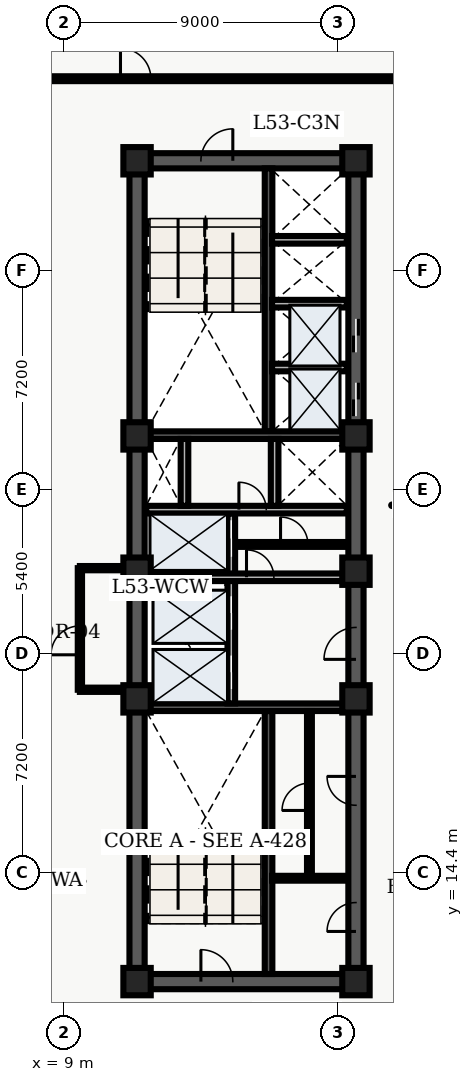
"""IFC4 building model, lengths in metres.
Left out: names, types, materials, properties, quantities, classifications, styles, units other than length and angle.
Written with IfcOpenShell. Run it as: python <this file> out.ifc"""

import sys

from ifc_helpers import new_model, entity, si_unit, converted_unit, direction, frame, origin_with_axes, origin_2d_with_axis, place, context, subcontext, project, spatial, polyline, rectangle, outline, extrude, element, fill, save


model = new_model("IFC4")
c1 = context("Model", 3, precision=1e-05, world=origin_with_axes(), true_north=direction((0.0, 1.0)))
c2 = subcontext(c1, "Body", "Model", "MODEL_VIEW")
j1 = project(units=[si_unit("LENGTHUNIT", "METRE"), converted_unit("PLANEANGLEUNIT", "DEGREE", entity("IfcPlaneAngleMeasure", 0.017), si_unit("PLANEANGLEUNIT", "RADIAN"), dimensions=[0, 0, 0, 0, 0, 0, 0])], contexts=[c1])
p1 = place(None, origin_with_axes())
s1 = spatial("IfcSite", under=j1, at=p1, CompositionType="ELEMENT")
p2 = place(p1, origin_with_axes())
s2 = spatial("IfcBuilding", under=s1, at=p2, CompositionType="ELEMENT")
p3 = place(p2, frame((0.0, 0.0, 216.0), z_axis=(0.0, 0.0, 1.0), x_axis=(1.0, 0.0, 0.0)))
s3 = spatial("IfcBuildingStorey", under=s2, at=p3, CompositionType="ELEMENT", Elevation=216.0)
p4 = place(p3, frame((11.4, 10.8, 0.0), z_axis=(0.0, 0.0, 1.0), x_axis=(0.0, 1.0, 0.0)))
e1 = element("IfcWall", 1, at=p4, inside=s3, PredefinedType="SHEAR", context=c2, shape_type="SweptSolid", body=[
    extrude(outline(polyline([(0.0, -0.25), (27.0, -0.25), (27.0, 0.25), (0.0, 0.25), (0.0, -0.25)])), origin_with_axes(), (0.0, 0.0, 1.0), 3.6),
])
p5 = place(p3, frame((11.4, 10.8, 0.0), z_axis=(0.0, 0.0, 1.0), x_axis=(1.0, 0.0, 0.0)))
e2 = element("IfcWall", 2, at=p5, inside=s3, PredefinedType="SHEAR", context=c2, shape_type="SweptSolid", body=[
    extrude(outline(polyline([(0.0, -0.25), (7.2, -0.25), (7.2, 0.25), (0.0, 0.25), (0.0, -0.25)])), origin_with_axes(), (0.0, 0.0, 1.0), 3.6),
])
p6 = place(p5, frame((2.625, 0.0, 0.0), z_axis=(0.0, 0.0, 1.0), x_axis=(1.0, 0.0, 0.0)))
e3 = element("IfcOpeningElement", 3, at=p6, cuts=e2, PredefinedType="OPENING", context=c2, shape_type="SweptSolid", body=[
    extrude(rectangle(XDim=1.05, YDim=0.52, at=origin_2d_with_axis()), origin_with_axes(), (0.0, 0.0, 1.0), 2.15),
])
p7 = place(p3, frame((11.4, 37.8, 0.0), z_axis=(0.0, 0.0, 1.0), x_axis=(1.0, 0.0, 0.0)))
e4 = element("IfcWall", 4, at=p7, inside=s3, PredefinedType="SHEAR", context=c2, shape_type="SweptSolid", body=[
    extrude(outline(polyline([(0.0, -0.25), (7.2, -0.25), (7.2, 0.25), (0.0, 0.25), (0.0, -0.25)])), origin_with_axes(), (0.0, 0.0, 1.0), 3.6),
])
p8 = place(p7, frame((2.625, 0.0, 0.0), z_axis=(0.0, 0.0, 1.0), x_axis=(1.0, 0.0, 0.0)))
e5 = element("IfcOpeningElement", 5, at=p8, cuts=e4, PredefinedType="OPENING", context=c2, shape_type="SweptSolid", body=[
    extrude(rectangle(XDim=1.05, YDim=0.52, at=origin_2d_with_axis()), origin_with_axes(), (0.0, 0.0, 1.0), 2.15),
])
p9 = place(p3, frame((18.6, 10.8, 0.0), z_axis=(0.0, 0.0, 1.0), x_axis=(0.0, 1.0, 0.0)))
e6 = element("IfcWall", 6, at=p9, inside=s3, PredefinedType="SHEAR", context=c2, shape_type="SweptSolid", body=[
    extrude(outline(polyline([(0.0, -0.25), (13.5, -0.25), (13.5, 0.25), (0.0, 0.25), (0.0, -0.25)])), origin_with_axes(), (0.0, 0.0, 1.0), 3.6),
])
p10 = place(p9, frame((11.125, 0.0, 0.0), z_axis=(0.0, 0.0, 1.0), x_axis=(1.0, 0.0, 0.0)))
e7 = element("IfcOpeningElement", 7, at=p10, cuts=e6, PredefinedType="OPENING", context=c2, shape_type="SweptSolid", body=[
    extrude(rectangle(XDim=1.05, YDim=0.52, at=origin_2d_with_axis()), origin_with_axes(), (0.0, 0.0, 1.0), 2.15),
])
p11 = place(p9, frame((2.125, 0.0, 0.0), z_axis=(0.0, 0.0, 1.0), x_axis=(1.0, 0.0, 0.0)))
e8 = element("IfcOpeningElement", 8, at=p11, cuts=e6, PredefinedType="OPENING", context=c2, shape_type="SweptSolid", body=[
    extrude(rectangle(XDim=0.95, YDim=0.52, at=origin_2d_with_axis()), origin_with_axes(), (0.0, 0.0, 1.0), 2.15),
])
p12 = place(p9, frame((6.275, 0.0, 0.0), z_axis=(0.0, 0.0, 1.0), x_axis=(1.0, 0.0, 0.0)))
e9 = element("IfcOpeningElement", 9, at=p12, cuts=e6, PredefinedType="OPENING", context=c2, shape_type="SweptSolid", body=[
    extrude(rectangle(XDim=0.95, YDim=0.52, at=origin_2d_with_axis()), origin_with_axes(), (0.0, 0.0, 1.0), 2.15),
])
p13 = place(p3, frame((18.6, 24.3, 0.0), z_axis=(0.0, 0.0, 1.0), x_axis=(0.0, 1.0, 0.0)))
e10 = element("IfcWall", 10, at=p13, inside=s3, PredefinedType="SHEAR", context=c2, shape_type="SweptSolid", body=[
    extrude(outline(polyline([(0.0, -0.25), (13.5, -0.25), (13.5, 0.25), (0.0, 0.25), (0.0, -0.25)])), origin_with_axes(), (0.0, 0.0, 1.0), 3.6),
])
p14 = place(p13, frame((5.65, 0.0, 0.0), z_axis=(0.0, 0.0, 1.0), x_axis=(1.0, 0.0, 0.0)))
e11 = element("IfcOpeningElement", 11, at=p14, cuts=e10, PredefinedType="OPENING", context=c2, shape_type="SweptSolid", body=[
    extrude(rectangle(XDim=1.1, YDim=0.52, at=origin_2d_with_axis()), origin_with_axes(), (0.0, 0.0, 1.0), 2.15),
])
p15 = place(p13, frame((7.75, 0.0, 0.0), z_axis=(0.0, 0.0, 1.0), x_axis=(1.0, 0.0, 0.0)))
e12 = element("IfcOpeningElement", 12, at=p15, cuts=e10, PredefinedType="OPENING", context=c2, shape_type="SweptSolid", body=[
    extrude(rectangle(XDim=1.1, YDim=0.52, at=origin_2d_with_axis()), origin_with_axes(), (0.0, 0.0, 1.0), 2.15),
])
p16 = place(p3, frame((15.725, 11.05, 0.0), z_axis=(0.0, 0.0, 1.0), x_axis=(0.0, 1.0, 0.0)))
e13 = element("IfcWall", 13, at=p16, inside=s3, PredefinedType="SHEAR", context=c2, shape_type="SweptSolid", body=[
    extrude(outline(polyline([(0.0, -0.125), (8.65, -0.125), (8.65, 0.125), (0.0, 0.125), (0.0, -0.125)])), origin_with_axes(), (0.0, 0.0, 1.0), 3.6),
])
p17 = place(p3, frame((11.65, 19.825, 0.0), z_axis=(0.0, 0.0, 1.0), x_axis=(1.0, 0.0, 0.0)))
e14 = element("IfcWall", 14, at=p17, inside=s3, PredefinedType="SHEAR", context=c2, shape_type="SweptSolid", body=[
    extrude(outline(polyline([(0.0, -0.125), (6.7, -0.125), (6.7, 0.125), (0.0, 0.125), (0.0, -0.125)])), origin_with_axes(), (0.0, 0.0, 1.0), 3.6),
])
p18 = place(p3, frame((15.725, 28.9, 0.0), z_axis=(0.0, 0.0, 1.0), x_axis=(0.0, 1.0, 0.0)))
e15 = element("IfcWall", 15, at=p18, inside=s3, PredefinedType="SHEAR", context=c2, shape_type="SweptSolid", body=[
    extrude(outline(polyline([(0.0, -0.125), (8.65, -0.125), (8.65, 0.125), (0.0, 0.125), (0.0, -0.125)])), origin_with_axes(), (0.0, 0.0, 1.0), 3.6),
])
p19 = place(p3, frame((11.65, 28.775, 0.0), z_axis=(0.0, 0.0, 1.0), x_axis=(1.0, 0.0, 0.0)))
e16 = element("IfcWall", 16, at=p19, inside=s3, PredefinedType="SHEAR", context=c2, shape_type="SweptSolid", body=[
    extrude(outline(polyline([(0.0, -0.125), (6.7, -0.125), (6.7, 0.125), (0.0, 0.125), (0.0, -0.125)])), origin_with_axes(), (0.0, 0.0, 1.0), 3.6),
])
p20 = place(p3, frame((14.5, 19.95, 0.0), z_axis=(0.0, 0.0, 1.0), x_axis=(0.0, 1.0, 0.0)))
e17 = element("IfcWall", 17, at=p20, inside=s3, PredefinedType="SOLIDWALL", context=c2, shape_type="SweptSolid", body=[
    extrude(outline(polyline([(0.0, -0.125), (6.25, -0.125), (6.25, 0.125), (0.0, 0.125), (0.0, -0.125)])), origin_with_axes(), (0.0, 0.0, 1.0), 2.64),
])
p21 = place(p20, frame((1.025, 0.0, 0.0), z_axis=(0.0, 0.0, 1.0), x_axis=(1.0, 0.0, 0.0)))
e18 = element("IfcOpeningElement", 18, at=p21, cuts=e17, PredefinedType="OPENING", context=c2, shape_type="SweptSolid", body=[
    extrude(rectangle(XDim=1.1, YDim=0.27, at=origin_2d_with_axis()), origin_with_axes(), (0.0, 0.0, 1.0), 2.15),
])
p22 = place(p20, frame((2.975, 0.0, 0.0), z_axis=(0.0, 0.0, 1.0), x_axis=(1.0, 0.0, 0.0)))
e19 = element("IfcOpeningElement", 19, at=p22, cuts=e17, PredefinedType="OPENING", context=c2, shape_type="SweptSolid", body=[
    extrude(rectangle(XDim=1.1, YDim=0.27, at=origin_2d_with_axis()), origin_with_axes(), (0.0, 0.0, 1.0), 2.15),
])
p23 = place(p20, frame((5.425, 0.0, 0.0), z_axis=(0.0, 0.0, 1.0), x_axis=(1.0, 0.0, 0.0)))
e20 = element("IfcOpeningElement", 20, at=p23, cuts=e17, PredefinedType="OPENING", context=c2, shape_type="SweptSolid", body=[
    extrude(rectangle(XDim=1.2, YDim=0.27, at=origin_2d_with_axis()), origin_with_axes(), (0.0, 0.0, 1.0), 2.15),
])
p24 = place(p3, frame((11.7, 24.1, 0.0), z_axis=(0.0, 0.0, 1.0), x_axis=(1.0, 0.0, 0.0)))
e21 = element("IfcWall", 21, at=p24, inside=s3, PredefinedType="SOLIDWALL", context=c2, shape_type="SweptSolid", body=[
    extrude(outline(polyline([(0.0, -0.125), (6.6, -0.125), (6.6, 0.125), (0.0, 0.125), (0.0, -0.125)])), origin_with_axes(), (0.0, 0.0, 1.0), 2.64),
])
p25 = place(p24, frame((3.75, 0.0, 0.0), z_axis=(0.0, 0.0, 1.0), x_axis=(1.0, 0.0, 0.0)))
e22 = element("IfcOpeningElement", 22, at=p25, cuts=e21, PredefinedType="OPENING", context=c2, shape_type="SweptSolid", body=[
    extrude(rectangle(XDim=0.9, YDim=0.27, at=origin_2d_with_axis()), origin_with_axes(), (0.0, 0.0, 1.0), 2.15),
])
p26 = place(p3, frame((11.7, 26.325, 0.0), z_axis=(0.0, 0.0, 1.0), x_axis=(1.0, 0.0, 0.0)))
e23 = element("IfcWall", 23, at=p26, inside=s3, PredefinedType="SOLIDWALL", context=c2, shape_type="SweptSolid", body=[
    extrude(outline(polyline([(0.0, -0.125), (6.6, -0.125), (6.6, 0.125), (0.0, 0.125), (0.0, -0.125)])), origin_with_axes(), (0.0, 0.0, 1.0), 2.64),
])
p27 = place(p26, frame((3.5, 0.0, 0.0), z_axis=(0.0, 0.0, 1.0), x_axis=(1.0, 0.0, 0.0)))
e24 = element("IfcOpeningElement", 24, at=p27, cuts=e23, PredefinedType="OPENING", context=c2, shape_type="SweptSolid", body=[
    extrude(rectangle(XDim=0.9, YDim=0.27, at=origin_2d_with_axis()), origin_with_axes(), (0.0, 0.0, 1.0), 2.15),
])
for number, where, z_axis, x_axis in (
    (25, (12.96, 26.45, 0.0), (0.0, 0.0, 1.0), (0.0, 1.0, 0.0)),
    (26, (15.925, 26.45, 0.0), (0.0, 0.0, 1.0), (0.0, 1.0, 0.0)),
):
    element("IfcWall", number, at=place(p3, frame(where, z_axis=z_axis, x_axis=x_axis)), inside=s3, PredefinedType="SOLIDWALL", context=c2, shape_type="SweptSolid", body=[
        extrude(outline(polyline([(0.0, -0.125), (2.2, -0.125), (2.2, 0.125), (0.0, 0.125), (0.0, -0.125)])), origin_with_axes(), (0.0, 0.0, 1.0), 2.64),
    ])
for number, where, z_axis, x_axis in (
    (27, (11.4, 10.8, 0.0), (0.0, 0.0, 1.0), (1.0, 0.0, 0.0)),
    (28, (11.4, 20.1, 0.0), (0.0, 0.0, 1.0), (1.0, 0.0, 0.0)),
    (29, (11.4, 24.3, 0.0), (0.0, 0.0, 1.0), (1.0, 0.0, 0.0)),
    (30, (11.4, 28.75, 0.0), (0.0, 0.0, 1.0), (1.0, 0.0, 0.0)),
    (31, (11.4, 37.8, 0.0), (0.0, 0.0, 1.0), (1.0, 0.0, 0.0)),
    (32, (18.6, 10.8, 0.0), (0.0, 0.0, 1.0), (1.0, 0.0, 0.0)),
    (33, (18.6, 20.1, 0.0), (0.0, 0.0, 1.0), (1.0, 0.0, 0.0)),
    (34, (18.6, 24.3, 0.0), (0.0, 0.0, 1.0), (1.0, 0.0, 0.0)),
    (35, (18.6, 28.75, 0.0), (0.0, 0.0, 1.0), (1.0, 0.0, 0.0)),
    (36, (18.6, 37.8, 0.0), (0.0, 0.0, 1.0), (1.0, 0.0, 0.0)),
):
    element("IfcColumn", number, at=place(p3, frame(where, z_axis=z_axis, x_axis=x_axis)), inside=s3, PredefinedType="COLUMN", context=c2, shape_type="SweptSolid", body=[
        extrude(rectangle(XDim=0.9, YDim=0.9, at=origin_2d_with_axis()), origin_with_axes(), (0.0, 0.0, 1.0), 3.9),
    ])
p28 = place(p3, frame((14.62, 25.18, 0.0), z_axis=(0.0, 0.0, 1.0), x_axis=(1.0, 0.0, 0.0)))
e37 = element("IfcWall", 37, at=p28, inside=s3, PredefinedType="PARTITIONING", context=c2, shape_type="SweptSolid", body=[
    extrude(outline(polyline([(0.0, -0.08), (3.68, -0.08), (3.68, 0.08), (0.0, 0.08), (0.0, -0.08)])), origin_with_axes(), (0.0, 0.0, 1.0), 2.64),
])
p29 = place(p28, frame((1.95, 0.0, 0.0), z_axis=(0.0, 0.0, 1.0), x_axis=(1.0, 0.0, 0.0)))
e38 = element("IfcOpeningElement", 38, at=p29, cuts=e37, PredefinedType="OPENING", context=c2, shape_type="SweptSolid", body=[
    extrude(rectangle(XDim=0.9, YDim=0.18, at=origin_2d_with_axis()), origin_with_axes(), (0.0, 0.0, 1.0), 2.15),
])
p30 = place(p3, frame((15.84, 14.2, 0.0), z_axis=(0.0, 0.0, 1.0), x_axis=(1.0, 0.0, 0.0)))
e39 = element("IfcWall", 39, at=p30, inside=s3, PredefinedType="PARTITIONING", context=c2, shape_type="SweptSolid", body=[
    extrude(outline(polyline([(0.0, -0.08), (2.46, -0.08), (2.46, 0.08), (0.0, 0.08), (0.0, -0.08)])), origin_with_axes(), (0.0, 0.0, 1.0), 2.64),
])
p31 = place(p3, frame((17.07, 14.28, 0.0), z_axis=(0.0, 0.0, 1.0), x_axis=(0.0, 1.0, 0.0)))
e40 = element("IfcWall", 40, at=p31, inside=s3, PredefinedType="PARTITIONING", context=c2, shape_type="SweptSolid", body=[
    extrude(outline(polyline([(0.0, -0.08), (5.42, -0.08), (5.42, 0.08), (0.0, 0.08), (0.0, -0.08)])), origin_with_axes(), (0.0, 0.0, 1.0), 2.64),
])
p32 = place(p31, frame((2.6, 0.0, 0.0), z_axis=(0.0, 0.0, 1.0), x_axis=(1.0, 0.0, 0.0)))
e41 = element("IfcOpeningElement", 41, at=p32, cuts=e40, PredefinedType="OPENING", context=c2, shape_type="SweptSolid", body=[
    extrude(rectangle(XDim=0.9, YDim=0.18, at=origin_2d_with_axis()), origin_with_axes(), (0.0, 0.0, 1.0), 2.15),
])
for number, where, z_axis, x_axis in (
    (42, (15.84, 31.0, 0.0), (0.0, 0.0, 1.0), (1.0, 0.0, 0.0)),
    (43, (15.84, 33.1, 0.0), (0.0, 0.0, 1.0), (1.0, 0.0, 0.0)),
    (44, (15.84, 35.2, 0.0), (0.0, 0.0, 1.0), (1.0, 0.0, 0.0)),
):
    element("IfcWall", number, at=place(p3, frame(where, z_axis=z_axis, x_axis=x_axis)), inside=s3, PredefinedType="SOLIDWALL", context=c2, shape_type="SweptSolid", body=[
        extrude(outline(polyline([(0.0, -0.125), (2.46, -0.125), (2.46, 0.125), (0.0, 0.125), (0.0, -0.125)])), origin_with_axes(), (0.0, 0.0, 1.0), 2.64),
    ])
p33 = place(p3, frame((9.52, 20.4, 0.0), z_axis=(0.0, 0.0, 1.0), x_axis=(0.0, 1.0, 0.0)))
e45 = element("IfcWall", 45, at=p33, inside=s3, PredefinedType="PARTITIONING", context=c2, shape_type="SweptSolid", body=[
    extrude(outline(polyline([(0.0, -0.07), (4.0, -0.07), (4.0, 0.07), (0.0, 0.07), (0.0, -0.07)])), origin_with_axes(), (0.0, 0.0, 1.0), 2.64),
])
p34 = place(p33, frame((1.625, 0.0, 0.0), z_axis=(0.0, 0.0, 1.0), x_axis=(1.0, 0.0, 0.0)))
e46 = element("IfcOpeningElement", 46, at=p34, cuts=e45, PredefinedType="OPENING", context=c2, shape_type="SweptSolid", body=[
    extrude(rectangle(XDim=0.95, YDim=0.16, at=origin_2d_with_axis()), origin_with_axes(), (0.0, 0.0, 1.0), 2.15),
])
for number, where, z_axis, x_axis in (
    (47, (9.52, 20.4, 0.0), (0.0, 0.0, 1.0), (1.0, 0.0, 0.0)),
    (48, (9.52, 24.4, 0.0), (0.0, 0.0, 1.0), (1.0, 0.0, 0.0)),
):
    element("IfcWall", number, at=place(p3, frame(where, z_axis=z_axis, x_axis=x_axis)), inside=s3, PredefinedType="PARTITIONING", context=c2, shape_type="SweptSolid", body=[
        extrude(outline(polyline([(0.0, -0.07), (1.58, -0.07), (1.58, 0.07), (0.0, 0.07), (0.0, -0.07)])), origin_with_axes(), (0.0, 0.0, 1.0), 2.64),
    ])
p35 = place(p3, frame((2.6, 40.5, 0.0), z_axis=(0.0, 0.0, 1.0), x_axis=(1.0, 0.0, 0.0)))
e49 = element("IfcWall", 49, at=p35, inside=s3, PredefinedType="PARTITIONING", context=c2, shape_type="SweptSolid", body=[
    extrude(outline(polyline([(0.0, -0.08), (29.465, -0.08), (29.465, 0.08), (0.0, 0.08), (0.0, -0.08)])), origin_with_axes(), (0.0, 0.0, 1.0), 2.64),
])
p36 = place(p35, frame((8.755, 0.0, 0.0), z_axis=(0.0, 0.0, 1.0), x_axis=(1.0, 0.0, 0.0)))
e50 = element("IfcOpeningElement", 50, at=p36, cuts=e49, PredefinedType="OPENING", context=c2, shape_type="SweptSolid", body=[
    extrude(rectangle(XDim=1.0, YDim=0.18, at=origin_2d_with_axis()), origin_with_axes(), (0.0, 0.0, 1.0), 2.15),
])
p37 = place(p13, frame((5.65, 0.0, 0.0), z_axis=(0.0, 0.0, 1.0), x_axis=(1.0, 0.0, 0.0)))
e51 = element("IfcDoor", 51, at=p37, inside=s3, OperationType="SLIDING_TO_LEFT", PredefinedType="DOOR", context=c2, shape_type="SweptSolid", body=[
    extrude(rectangle(XDim=1.1, YDim=0.09, at=origin_2d_with_axis()), origin_with_axes(), (0.0, 0.0, 1.0), 2.15),
])
fill(e11, e51)
p38 = place(p13, frame((7.75, 0.0, 0.0), z_axis=(0.0, 0.0, 1.0), x_axis=(1.0, 0.0, 0.0)))
e52 = element("IfcDoor", 52, at=p38, inside=s3, OperationType="SLIDING_TO_RIGHT", PredefinedType="DOOR", context=c2, shape_type="SweptSolid", body=[
    extrude(rectangle(XDim=1.1, YDim=0.09, at=origin_2d_with_axis()), origin_with_axes(), (0.0, 0.0, 1.0), 2.15),
])
fill(e12, e52)
p39 = place(p20, frame((1.025, 0.0, 0.0), z_axis=(0.0, 0.0, 1.0), x_axis=(1.0, 0.0, 0.0)))
e53 = element("IfcDoor", 53, at=p39, inside=s3, OperationType="SLIDING_TO_LEFT", PredefinedType="DOOR", context=c2, shape_type="SweptSolid", body=[
    extrude(rectangle(XDim=1.1, YDim=0.09, at=origin_2d_with_axis()), origin_with_axes(), (0.0, 0.0, 1.0), 2.15),
])
fill(e18, e53)
p40 = place(p20, frame((2.975, 0.0, 0.0), z_axis=(0.0, 0.0, 1.0), x_axis=(1.0, 0.0, 0.0)))
e54 = element("IfcDoor", 54, at=p40, inside=s3, OperationType="SLIDING_TO_RIGHT", PredefinedType="DOOR", context=c2, shape_type="SweptSolid", body=[
    extrude(rectangle(XDim=1.1, YDim=0.09, at=origin_2d_with_axis()), origin_with_axes(), (0.0, 0.0, 1.0), 2.15),
])
fill(e19, e54)
p41 = place(p20, frame((5.425, 0.0, 0.0), z_axis=(0.0, 0.0, 1.0), x_axis=(1.0, 0.0, 0.0)))
e55 = element("IfcDoor", 55, at=p41, inside=s3, OperationType="DOUBLE_DOOR_SLIDING", PredefinedType="DOOR", context=c2, shape_type="SweptSolid", body=[
    extrude(rectangle(XDim=1.2, YDim=0.09, at=origin_2d_with_axis()), origin_with_axes(), (0.0, 0.0, 1.0), 2.15),
])
fill(e20, e55)
p42 = place(p5, frame((2.625, 0.0, 0.0), z_axis=(0.0, 0.0, 1.0), x_axis=(1.0, 0.0, 0.0)))
e56 = element("IfcDoor", 56, at=p42, inside=s3, OperationType="SINGLE_SWING_LEFT", PredefinedType="DOOR", context=c2, shape_type="SweptSolid", body=[
    extrude(rectangle(XDim=1.05, YDim=0.09, at=origin_2d_with_axis()), origin_with_axes(), (0.0, 0.0, 1.0), 2.15),
])
fill(e3, e56)
p43 = place(p7, frame((2.625, 0.0, 0.0), z_axis=(0.0, 0.0, 1.0), x_axis=(1.0, 0.0, 0.0)))
e57 = element("IfcDoor", 57, at=p43, inside=s3, OperationType="SINGLE_SWING_RIGHT", PredefinedType="DOOR", context=c2, shape_type="SweptSolid", body=[
    extrude(rectangle(XDim=1.05, YDim=0.09, at=origin_2d_with_axis()), origin_with_axes(), (0.0, 0.0, 1.0), 2.15),
])
fill(e5, e57)
p44 = place(p9, frame((11.125, 0.0, 0.0), z_axis=(0.0, 0.0, 1.0), x_axis=(1.0, 0.0, 0.0)))
e58 = element("IfcDoor", 58, at=p44, inside=s3, OperationType="SINGLE_SWING_LEFT", PredefinedType="DOOR", context=c2, shape_type="SweptSolid", body=[
    extrude(rectangle(XDim=1.05, YDim=0.09, at=origin_2d_with_axis()), origin_with_axes(), (0.0, 0.0, 1.0), 2.15),
])
fill(e7, e58)
p45 = place(p26, frame((3.5, 0.0, 0.0), z_axis=(0.0, 0.0, 1.0), x_axis=(1.0, 0.0, 0.0)))
e59 = element("IfcDoor", 59, at=p45, inside=s3, OperationType="SINGLE_SWING_LEFT", PredefinedType="DOOR", context=c2, shape_type="SweptSolid", body=[
    extrude(rectangle(XDim=0.9, YDim=0.09, at=origin_2d_with_axis()), origin_with_axes(), (0.0, 0.0, 1.0), 2.15),
])
fill(e24, e59)
p46 = place(p24, frame((3.75, 0.0, 0.0), z_axis=(0.0, 0.0, 1.0), x_axis=(1.0, 0.0, 0.0)))
e60 = element("IfcDoor", 60, at=p46, inside=s3, OperationType="SINGLE_SWING_LEFT", PredefinedType="DOOR", context=c2, shape_type="SweptSolid", body=[
    extrude(rectangle(XDim=0.9, YDim=0.09, at=origin_2d_with_axis()), origin_with_axes(), (0.0, 0.0, 1.0), 2.15),
])
fill(e22, e60)
p47 = place(p28, frame((1.95, 0.0, 0.0), z_axis=(0.0, 0.0, 1.0), x_axis=(1.0, 0.0, 0.0)))
e61 = element("IfcDoor", 61, at=p47, inside=s3, OperationType="SINGLE_SWING_LEFT", PredefinedType="DOOR", context=c2, shape_type="SweptSolid", body=[
    extrude(rectangle(XDim=0.9, YDim=0.09, at=origin_2d_with_axis()), origin_with_axes(), (0.0, 0.0, 1.0), 2.15),
])
fill(e38, e61)
p48 = place(p9, frame((2.125, 0.0, 0.0), z_axis=(0.0, 0.0, 1.0), x_axis=(1.0, 0.0, 0.0)))
e62 = element("IfcDoor", 62, at=p48, inside=s3, OperationType="SINGLE_SWING_LEFT", PredefinedType="DOOR", context=c2, shape_type="SweptSolid", body=[
    extrude(rectangle(XDim=0.95, YDim=0.09, at=origin_2d_with_axis()), origin_with_axes(), (0.0, 0.0, 1.0), 2.15),
])
fill(e8, e62)
p49 = place(p31, frame((2.6, 0.0, 0.0), z_axis=(0.0, 0.0, 1.0), x_axis=(1.0, 0.0, 0.0)))
e63 = element("IfcDoor", 63, at=p49, inside=s3, OperationType="SINGLE_SWING_LEFT", PredefinedType="DOOR", context=c2, shape_type="SweptSolid", body=[
    extrude(rectangle(XDim=0.9, YDim=0.09, at=origin_2d_with_axis()), origin_with_axes(), (0.0, 0.0, 1.0), 2.15),
])
fill(e41, e63)
p50 = place(p9, frame((6.275, 0.0, 0.0), z_axis=(0.0, 0.0, 1.0), x_axis=(1.0, 0.0, 0.0)))
e64 = element("IfcDoor", 64, at=p50, inside=s3, OperationType="SINGLE_SWING_RIGHT", PredefinedType="DOOR", context=c2, shape_type="SweptSolid", body=[
    extrude(rectangle(XDim=0.95, YDim=0.09, at=origin_2d_with_axis()), origin_with_axes(), (0.0, 0.0, 1.0), 2.15),
])
fill(e9, e64)
p51 = place(p33, frame((1.625, 0.0, 0.0), z_axis=(0.0, 0.0, 1.0), x_axis=(1.0, 0.0, 0.0)))
e65 = element("IfcDoor", 65, at=p51, inside=s3, OperationType="SINGLE_SWING_LEFT", PredefinedType="DOOR", context=c2, shape_type="SweptSolid", body=[
    extrude(rectangle(XDim=0.95, YDim=0.084, at=origin_2d_with_axis()), origin_with_axes(), (0.0, 0.0, 1.0), 2.15),
])
fill(e46, e65)
p52 = place(p35, frame((8.755, 0.0, 0.0), z_axis=(0.0, 0.0, 1.0), x_axis=(1.0, 0.0, 0.0)))
e66 = element("IfcDoor", 66, at=p52, inside=s3, OperationType="SINGLE_SWING_LEFT", PredefinedType="DOOR", context=c2, shape_type="SweptSolid", body=[
    extrude(rectangle(XDim=1.0, YDim=0.09, at=origin_2d_with_axis()), origin_with_axes(), (0.0, 0.0, 1.0), 2.15),
])
fill(e50, e66)
save(model, sys.argv[1])
